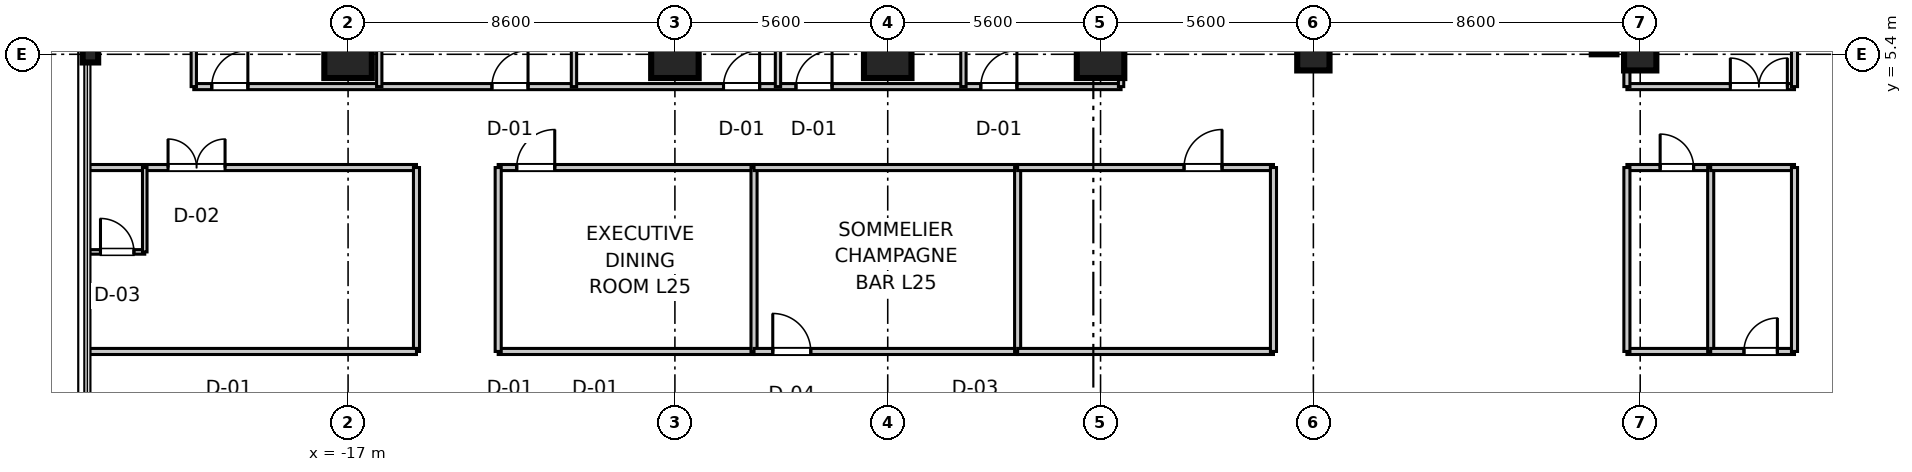
"""IFC4 building model, lengths in metres.
Left out: names, types, materials, properties, quantities, classifications, styles, units other than length and angle.
Written with IfcOpenShell. Run it as: python <this file> out.ifc"""

import sys

from ifc_helpers import new_model, si_unit, direction, frame, frame_2d, origin, origin_2d, place, context, subcontext, project, spatial, rectangle, i_section, extrude, source, transform, mapped, element, fill, save


model = new_model("IFC4")
c1 = context("Model", 3, precision=1e-05, world=origin(), true_north=direction((0.0, 1.0)))
c2 = subcontext(c1, "Body", "Model", "MODEL_VIEW")
j1 = project(units=[si_unit("LENGTHUNIT", "METRE"), si_unit("PLANEANGLEUNIT", "RADIAN")], contexts=[c1])
p1 = place(None, origin())
s1 = spatial("IfcSite", under=j1, at=p1, CompositionType="ELEMENT")
p2 = place(p1, origin())
s2 = spatial("IfcBuilding", under=s1, at=p2, CompositionType="ELEMENT")
p3 = place(p2, frame((0.0, 0.0, 102.9)))
s3 = spatial("IfcBuildingStorey", under=s2, at=p3, CompositionType="ELEMENT", Elevation=102.9)
m1 = source(origin(), c2, "Body", "SweptSolid", [
    extrude(rectangle(XDim=1.25, YDim=1.25, at=origin_2d()), origin(), (0.0, 0.0, 1.0), 3.605),
])
for number, where, z_axis, x_axis in (
    (1, (-17.0, 5.4, 0.0), (0.0, 0.0, 1.0), (1.0, 0.0, 0.0)),
    (2, (-8.4, 5.4, 0.0), (0.0, 0.0, 1.0), (1.0, 0.0, 0.0)),
    (3, (-2.8, 5.4, 0.0), (0.0, 0.0, 1.0), (1.0, 0.0, 0.0)),
    (4, (2.8, 5.4, 0.0), (0.0, 0.0, 1.0), (1.0, 0.0, 0.0)),
):
    element("IfcColumn", number, at=place(p3, frame(where, z_axis=z_axis, x_axis=x_axis)), inside=s3, PredefinedType="COLUMN", context=c2, shape_type="MappedRepresentation", body=[
        mapped(m1, transform((0.0, 0.0, 0.0), scale=1.0)),
    ])
m2 = source(origin(), c2, "Body", "SweptSolid", [
    extrude(rectangle(XDim=0.85, YDim=0.85, at=origin_2d()), origin(), (0.0, 0.0, 1.0), 3.605),
])
for number, where, z_axis, x_axis in (
    (5, (8.4, 5.4, 0.0), (0.0, 0.0, 1.0), (1.0, 0.0, 0.0)),
    (6, (17.0, 5.4, 0.0), (0.0, 0.0, 1.0), (1.0, 0.0, 0.0)),
):
    element("IfcColumn", number, at=place(p3, frame(where, z_axis=z_axis, x_axis=x_axis)), inside=s3, PredefinedType="PILASTER", context=c2, shape_type="MappedRepresentation", body=[
        mapped(m2, transform((0.0, 0.0, 0.0), scale=1.0)),
    ])
m3 = source(origin(), c2, "Body", "SweptSolid", [
    extrude(i_section(OverallWidth=0.409, OverallDepth=0.43, WebThickness=0.021, FlangeThickness=0.034, at=origin_2d()), origin(), (0.0, 0.0, 1.0), 3.605),
])
p4 = place(p3, frame((-23.78, 5.4, 0.0), z_axis=(0.0, 0.0, 1.0), x_axis=(1.0, 0.0, 0.0)))
e7 = element("IfcColumn", 7, at=p4, inside=s3, PredefinedType="COLUMN", context=c2, shape_type="MappedRepresentation", body=[
    mapped(m3, transform((0.0, 0.0, 0.0), scale=1.0)),
])
m4 = source(origin(), c2, "Body", "SweptSolid", [
    extrude(rectangle(XDim=11.6, YDim=0.65, at=frame_2d((5.8, 0.0))), origin(), (0.0, 0.0, 1.0), 3.38),
])
p5 = place(p3, frame((16.05, 5.4, 0.0), z_axis=(0.0, 0.0, 1.0), x_axis=(0.0, 1.0, 0.0)))
e8 = element("IfcWall", 8, at=p5, inside=s3, PredefinedType="SHEAR", context=c2, shape_type="MappedRepresentation", body=[
    mapped(m4, transform((0.0, 0.0, 0.0), scale=1.0)),
])
m5 = source(origin(), c2, "Body", "SweptSolid", [
    extrude(rectangle(XDim=4.41, YDim=0.16, at=frame_2d((2.205, 0.0))), origin(), (0.0, 0.0, 1.0), 2.72),
])
p6 = place(p3, frame((16.65, 4.55, 0.0), z_axis=(0.0, 0.0, 1.0), x_axis=(1.0, 0.0, 0.0)))
e9 = element("IfcWall", 9, at=p6, inside=s3, PredefinedType="PARTITIONING", context=c2, shape_type="MappedRepresentation", body=[
    mapped(m5, transform((0.0, 0.0, 0.0), scale=1.0)),
])
p7 = place(p6, frame((2.722, 0.0, 0.0)))
e10 = element("IfcOpeningElement", 10, at=p7, cuts=e9, PredefinedType="OPENING", context=c2, shape_type="SweptSolid", body=[
    extrude(rectangle(XDim=1.5, YDim=2.15, at=frame_2d((0.75, 1.075))), frame((0.0, 0.09, 0.0), z_axis=(0.0, -1.0, 0.0), x_axis=(1.0, 0.0, 0.0)), (0.0, 0.0, 1.0), 0.18),
])
m6 = source(origin(), c2, "Body", "SweptSolid", [
    extrude(rectangle(XDim=19.25, YDim=0.16, at=frame_2d((9.625, 0.0))), origin(), (0.0, 0.0, 1.0), 2.72),
])
p8 = place(p3, frame((16.65, 4.55, 0.0), z_axis=(0.0, 0.0, 1.0), x_axis=(0.0, 1.0, 0.0)))
e11 = element("IfcWall", 11, at=p8, inside=s3, PredefinedType="PARTITIONING", context=c2, shape_type="MappedRepresentation", body=[
    mapped(m6, transform((0.0, 0.0, 0.0), scale=1.0)),
])
m7 = source(origin(), c2, "Body", "SweptSolid", [
    extrude(rectangle(XDim=17.83, YDim=0.16, at=frame_2d((8.915, 0.0))), origin(), (0.0, 0.0, 1.0), 2.72),
])
p9 = place(p3, frame((21.06, 4.55, 0.0), z_axis=(0.0, 0.0, 1.0), x_axis=(0.0, 1.0, 0.0)))
e12 = element("IfcWall", 12, at=p9, inside=s3, PredefinedType="PARTITIONING", context=c2, shape_type="MappedRepresentation", body=[
    mapped(m7, transform((0.0, 0.0, 0.0), scale=1.0)),
])
m8 = source(origin(), c2, "Body", "SweptSolid", [
    extrude(rectangle(XDim=24.4, YDim=0.16, at=frame_2d((12.2, 0.0))), origin(), (0.0, 0.0, 1.0), 2.72),
])
p10 = place(p3, frame((-21.06, 4.55, 0.0), z_axis=(0.0, 0.0, 1.0), x_axis=(1.0, 0.0, 0.0)))
e13 = element("IfcWall", 13, at=p10, inside=s3, PredefinedType="PARTITIONING", context=c2, shape_type="MappedRepresentation", body=[
    mapped(m8, transform((0.0, 0.0, 0.0), scale=1.0)),
])
p11 = place(p10, frame((0.473, 0.0, 0.0)))
e14 = element("IfcOpeningElement", 14, at=p11, cuts=e13, PredefinedType="OPENING", context=c2, shape_type="SweptSolid", body=[
    extrude(rectangle(XDim=0.95, YDim=2.1, at=frame_2d((0.475, 1.05))), frame((0.0, 0.09, 0.0), z_axis=(0.0, -1.0, 0.0), x_axis=(1.0, 0.0, 0.0)), (0.0, 0.0, 1.0), 0.18),
])
p12 = place(p10, frame((7.845, 0.0, 0.0)))
e15 = element("IfcOpeningElement", 15, at=p12, cuts=e13, PredefinedType="OPENING", context=c2, shape_type="SweptSolid", body=[
    extrude(rectangle(XDim=0.95, YDim=2.1, at=frame_2d((0.475, 1.05))), frame((0.0, 0.09, 0.0), z_axis=(0.0, -1.0, 0.0), x_axis=(1.0, 0.0, 0.0)), (0.0, 0.0, 1.0), 0.18),
])
p13 = place(p10, frame((13.939, 0.0, 0.0)))
e16 = element("IfcOpeningElement", 16, at=p13, cuts=e13, PredefinedType="OPENING", context=c2, shape_type="SweptSolid", body=[
    extrude(rectangle(XDim=0.95, YDim=2.1, at=frame_2d((0.475, 1.05))), frame((0.0, 0.09, 0.0), z_axis=(0.0, -1.0, 0.0), x_axis=(1.0, 0.0, 0.0)), (0.0, 0.0, 1.0), 0.18),
])
p14 = place(p10, frame((15.845, 0.0, 0.0)))
e17 = element("IfcOpeningElement", 17, at=p14, cuts=e13, PredefinedType="OPENING", context=c2, shape_type="SweptSolid", body=[
    extrude(rectangle(XDim=0.95, YDim=2.1, at=frame_2d((0.475, 1.05))), frame((0.0, 0.09, 0.0), z_axis=(0.0, -1.0, 0.0), x_axis=(1.0, 0.0, 0.0)), (0.0, 0.0, 1.0), 0.18),
])
p15 = place(p10, frame((20.709, 0.0, 0.0)))
e18 = element("IfcOpeningElement", 18, at=p15, cuts=e13, PredefinedType="OPENING", context=c2, shape_type="SweptSolid", body=[
    extrude(rectangle(XDim=0.95, YDim=2.1, at=frame_2d((0.475, 1.05))), frame((0.0, 0.09, 0.0), z_axis=(0.0, -1.0, 0.0), x_axis=(1.0, 0.0, 0.0)), (0.0, 0.0, 1.0), 0.18),
])
m9 = source(origin(), c2, "Body", "SweptSolid", [
    extrude(rectangle(XDim=17.83, YDim=0.14, at=frame_2d((8.915, 0.0))), origin(), (0.0, 0.0, 1.0), 2.72),
])
p16 = place(p3, frame((-21.06, 4.55, 0.0), z_axis=(0.0, 0.0, 1.0), x_axis=(0.0, 1.0, 0.0)))
e19 = element("IfcWall", 19, at=p16, inside=s3, PredefinedType="PARTITIONING", context=c2, shape_type="MappedRepresentation", body=[
    mapped(m9, transform((0.0, 0.0, 0.0), scale=1.0)),
])
m10 = source(origin(), c2, "Body", "SweptSolid", [
    extrude(rectangle(XDim=19.25, YDim=0.14, at=frame_2d((9.625, 0.0))), origin(), (0.0, 0.0, 1.0), 2.72),
])
for number, where, z_axis, x_axis in (
    (20, (3.34, 4.55, 0.0), (0.0, 0.0, 1.0), (0.0, 1.0, 0.0)),
    (21, (-16.18, 4.55, 0.0), (0.0, 0.0, 1.0), (0.0, 1.0, 0.0)),
    (22, (-11.056, 4.55, 0.0), (0.0, 0.0, 1.0), (0.0, 1.0, 0.0)),
    (23, (-5.688, 4.55, 0.0), (0.0, 0.0, 1.0), (0.0, 1.0, 0.0)),
    (24, (-0.808, 4.55, 0.0), (0.0, 0.0, 1.0), (0.0, 1.0, 0.0)),
):
    element("IfcWall", number, at=place(p3, frame(where, z_axis=z_axis, x_axis=x_axis)), inside=s3, PredefinedType="PARTITIONING", context=c2, shape_type="MappedRepresentation", body=[
        mapped(m10, transform((0.0, 0.0, 0.0), scale=1.0)),
    ])
m11 = source(origin(), c2, "Body", "SweptSolid", [
    extrude(rectangle(XDim=8.6, YDim=0.16, at=frame_2d((4.3, 0.0))), origin(), (0.0, 0.0, 1.0), 2.72),
])
p17 = place(p3, frame((-23.8, 2.42, 0.0), z_axis=(0.0, 0.0, 1.0), x_axis=(1.0, 0.0, 0.0)))
e25 = element("IfcWall", 25, at=p17, inside=s3, PredefinedType="PARTITIONING", context=c2, shape_type="MappedRepresentation", body=[
    mapped(m11, transform((0.0, 0.0, 0.0), scale=1.0)),
])
p18 = place(p17, frame((2.063, 0.0, 0.0)))
e26 = element("IfcOpeningElement", 26, at=p18, cuts=e25, PredefinedType="OPENING", context=c2, shape_type="SweptSolid", body=[
    extrude(rectangle(XDim=1.5, YDim=2.15, at=frame_2d((0.75, 1.075))), frame((0.0, 0.09, 0.0), z_axis=(0.0, -1.0, 0.0), x_axis=(1.0, 0.0, 0.0)), (0.0, 0.0, 1.0), 0.18),
])
m12 = source(origin(), c2, "Body", "SweptSolid", [
    extrude(rectangle(XDim=4.84, YDim=0.16, at=frame_2d((2.42, 0.0))), origin(), (0.0, 0.0, 1.0), 2.72),
])
p19 = place(p3, frame((-15.2, -2.42, 0.0), z_axis=(0.0, 0.0, 1.0), x_axis=(0.0, 1.0, 0.0)))
e27 = element("IfcWall", 27, at=p19, inside=s3, PredefinedType="PARTITIONING", context=c2, shape_type="MappedRepresentation", body=[
    mapped(m12, transform((0.0, 0.0, 0.0), scale=1.0)),
])
p20 = place(p3, frame((-23.8, -2.42, 0.0), z_axis=(0.0, 0.0, 1.0), x_axis=(1.0, 0.0, 0.0)))
e28 = element("IfcWall", 28, at=p20, inside=s3, PredefinedType="PARTITIONING", context=c2, shape_type="MappedRepresentation", body=[
    mapped(m11, transform((0.0, 0.0, 0.0), scale=1.0)),
])
m13 = source(origin(), c2, "Body", "SweptSolid", [
    extrude(rectangle(XDim=1.45, YDim=0.12, at=frame_2d((0.725, 0.0))), origin(), (0.0, 0.0, 1.0), 2.72),
])
p21 = place(p3, frame((-23.8, 0.2, 0.0), z_axis=(0.0, 0.0, 1.0), x_axis=(1.0, 0.0, 0.0)))
e29 = element("IfcWall", 29, at=p21, inside=s3, PredefinedType="PARTITIONING", context=c2, shape_type="MappedRepresentation", body=[
    mapped(m13, transform((0.0, 0.0, 0.0), scale=1.0)),
])
p22 = place(p21, frame((0.285, 0.0, 0.0)))
e30 = element("IfcOpeningElement", 30, at=p22, cuts=e29, PredefinedType="OPENING", context=c2, shape_type="SweptSolid", body=[
    extrude(rectangle(XDim=0.88, YDim=2.1, at=frame_2d((0.44, 1.05))), frame((0.0, 0.07, 0.0), z_axis=(0.0, -1.0, 0.0), x_axis=(1.0, 0.0, 0.0)), (0.0, 0.0, 1.0), 0.14),
])
m14 = source(origin(), c2, "Body", "SweptSolid", [
    extrude(rectangle(XDim=2.22, YDim=0.12, at=frame_2d((1.11, 0.0))), origin(), (0.0, 0.0, 1.0), 2.72),
])
p23 = place(p3, frame((-22.35, 0.2, 0.0), z_axis=(0.0, 0.0, 1.0), x_axis=(0.0, 1.0, 0.0)))
e31 = element("IfcWall", 31, at=p23, inside=s3, PredefinedType="PARTITIONING", context=c2, shape_type="MappedRepresentation", body=[
    mapped(m14, transform((0.0, 0.0, 0.0), scale=1.0)),
])
m15 = source(origin(), c2, "Body", "SweptSolid", [
    extrude(rectangle(XDim=6.732, YDim=0.16, at=frame_2d((3.366, 0.0))), origin(), (0.0, 0.0, 1.0), 2.72),
])
p24 = place(p3, frame((-13.05, -2.42, 0.0), z_axis=(0.0, 0.0, 1.0), x_axis=(1.0, 0.0, 0.0)))
e32 = element("IfcWall", 32, at=p24, inside=s3, PredefinedType="PARTITIONING", context=c2, shape_type="MappedRepresentation", body=[
    mapped(m15, transform((0.0, 0.0, 0.0), scale=1.0)),
])
p25 = place(p3, frame((-13.05, 2.42, 0.0), z_axis=(0.0, 0.0, 1.0), x_axis=(1.0, 0.0, 0.0)))
e33 = element("IfcWall", 33, at=p25, inside=s3, PredefinedType="PARTITIONING", context=c2, shape_type="MappedRepresentation", body=[
    mapped(m15, transform((0.0, 0.0, 0.0), scale=1.0)),
])
p26 = place(p25, frame((0.488, 0.0, 0.0)))
e34 = element("IfcOpeningElement", 34, at=p26, cuts=e33, PredefinedType="OPENING", context=c2, shape_type="SweptSolid", body=[
    extrude(rectangle(XDim=1.0, YDim=2.1, at=frame_2d((0.5, 1.05))), frame((0.0, 0.09, 0.0), z_axis=(0.0, -1.0, 0.0), x_axis=(1.0, 0.0, 0.0)), (0.0, 0.0, 1.0), 0.18),
])
for number, where, z_axis, x_axis in (
    (35, (-13.05, -2.42, 0.0), (0.0, 0.0, 1.0), (0.0, 1.0, 0.0)),
    (36, (-6.318, -2.42, 0.0), (0.0, 0.0, 1.0), (0.0, 1.0, 0.0)),
):
    element("IfcWall", number, at=place(p3, frame(where, z_axis=z_axis, x_axis=x_axis)), inside=s3, PredefinedType="PARTITIONING", context=c2, shape_type="MappedRepresentation", body=[
        mapped(m12, transform((0.0, 0.0, 0.0), scale=1.0)),
    ])
m16 = source(origin(), c2, "Body", "SweptSolid", [
    extrude(rectangle(XDim=6.936, YDim=0.16, at=frame_2d((3.468, 0.0))), origin(), (0.0, 0.0, 1.0), 2.72),
])
p27 = place(p3, frame((-6.318, -2.42, 0.0), z_axis=(0.0, 0.0, 1.0), x_axis=(1.0, 0.0, 0.0)))
e37 = element("IfcWall", 37, at=p27, inside=s3, PredefinedType="PARTITIONING", context=c2, shape_type="MappedRepresentation", body=[
    mapped(m16, transform((0.0, 0.0, 0.0), scale=1.0)),
])
p28 = place(p27, frame((0.493, 0.0, 0.0)))
e38 = element("IfcOpeningElement", 38, at=p28, cuts=e37, PredefinedType="OPENING", context=c2, shape_type="SweptSolid", body=[
    extrude(rectangle(XDim=1.0, YDim=2.1, at=frame_2d((0.5, 1.05))), frame((0.0, 0.09, 0.0), z_axis=(0.0, -1.0, 0.0), x_axis=(1.0, 0.0, 0.0)), (0.0, 0.0, 1.0), 0.18),
])
p29 = place(p3, frame((-6.318, 2.42, 0.0), z_axis=(0.0, 0.0, 1.0), x_axis=(1.0, 0.0, 0.0)))
e39 = element("IfcWall", 39, at=p29, inside=s3, PredefinedType="PARTITIONING", context=c2, shape_type="MappedRepresentation", body=[
    mapped(m16, transform((0.0, 0.0, 0.0), scale=1.0)),
])
p30 = place(p3, frame((0.618, -2.42, 0.0), z_axis=(0.0, 0.0, 1.0), x_axis=(0.0, 1.0, 0.0)))
e40 = element("IfcWall", 40, at=p30, inside=s3, PredefinedType="PARTITIONING", context=c2, shape_type="MappedRepresentation", body=[
    mapped(m12, transform((0.0, 0.0, 0.0), scale=1.0)),
])
m17 = source(origin(), c2, "Body", "SweptSolid", [
    extrude(rectangle(XDim=6.732, YDim=0.16, at=frame_2d((3.366, 0.0))), origin(), (0.0, 0.0, 1.0), 2.72),
])
p31 = place(p3, frame((0.618, -2.42, 0.0), z_axis=(0.0, 0.0, 1.0), x_axis=(1.0, 0.0, 0.0)))
e41 = element("IfcWall", 41, at=p31, inside=s3, PredefinedType="PARTITIONING", context=c2, shape_type="MappedRepresentation", body=[
    mapped(m17, transform((0.0, 0.0, 0.0), scale=1.0)),
])
p32 = place(p3, frame((0.618, 2.42, 0.0), z_axis=(0.0, 0.0, 1.0), x_axis=(1.0, 0.0, 0.0)))
e42 = element("IfcWall", 42, at=p32, inside=s3, PredefinedType="PARTITIONING", context=c2, shape_type="MappedRepresentation", body=[
    mapped(m17, transform((0.0, 0.0, 0.0), scale=1.0)),
])
p33 = place(p32, frame((4.379, 0.0, 0.0)))
e43 = element("IfcOpeningElement", 43, at=p33, cuts=e42, PredefinedType="OPENING", context=c2, shape_type="SweptSolid", body=[
    extrude(rectangle(XDim=1.0, YDim=2.1, at=frame_2d((0.5, 1.05))), frame((0.0, 0.09, 0.0), z_axis=(0.0, -1.0, 0.0), x_axis=(1.0, 0.0, 0.0)), (0.0, 0.0, 1.0), 0.18),
])
p34 = place(p3, frame((7.35, -2.42, 0.0), z_axis=(0.0, 0.0, 1.0), x_axis=(0.0, 1.0, 0.0)))
e44 = element("IfcWall", 44, at=p34, inside=s3, PredefinedType="PARTITIONING", context=c2, shape_type="MappedRepresentation", body=[
    mapped(m12, transform((0.0, 0.0, 0.0), scale=1.0)),
])
m18 = source(origin(), c2, "Body", "SweptSolid", [
    extrude(rectangle(XDim=2.205, YDim=0.16, at=frame_2d((1.103, 0.0))), origin(), (0.0, 0.0, 1.0), 2.72),
])
p35 = place(p3, frame((16.65, -2.42, 0.0), z_axis=(0.0, 0.0, 1.0), x_axis=(1.0, 0.0, 0.0)))
e45 = element("IfcWall", 45, at=p35, inside=s3, PredefinedType="PARTITIONING", context=c2, shape_type="MappedRepresentation", body=[
    mapped(m18, transform((0.0, 0.0, 0.0), scale=1.0)),
])
p36 = place(p3, frame((16.65, 2.42, 0.0), z_axis=(0.0, 0.0, 1.0), x_axis=(1.0, 0.0, 0.0)))
e46 = element("IfcWall", 46, at=p36, inside=s3, PredefinedType="PARTITIONING", context=c2, shape_type="MappedRepresentation", body=[
    mapped(m18, transform((0.0, 0.0, 0.0), scale=1.0)),
])
p37 = place(p36, frame((0.875, 0.0, 0.0)))
e47 = element("IfcOpeningElement", 47, at=p37, cuts=e46, PredefinedType="OPENING", context=c2, shape_type="SweptSolid", body=[
    extrude(rectangle(XDim=0.88, YDim=2.1, at=frame_2d((0.44, 1.05))), frame((0.0, 0.09, 0.0), z_axis=(0.0, -1.0, 0.0), x_axis=(1.0, 0.0, 0.0)), (0.0, 0.0, 1.0), 0.18),
])
for number, where, z_axis, x_axis in (
    (48, (16.65, -2.42, 0.0), (0.0, 0.0, 1.0), (0.0, 1.0, 0.0)),
    (49, (18.855, -2.42, 0.0), (0.0, 0.0, 1.0), (0.0, 1.0, 0.0)),
):
    element("IfcWall", number, at=place(p3, frame(where, z_axis=z_axis, x_axis=x_axis)), inside=s3, PredefinedType="PARTITIONING", context=c2, shape_type="MappedRepresentation", body=[
        mapped(m12, transform((0.0, 0.0, 0.0), scale=1.0)),
    ])
p38 = place(p3, frame((18.855, -2.42, 0.0), z_axis=(0.0, 0.0, 1.0), x_axis=(1.0, 0.0, 0.0)))
e50 = element("IfcWall", 50, at=p38, inside=s3, PredefinedType="PARTITIONING", context=c2, shape_type="MappedRepresentation", body=[
    mapped(m18, transform((0.0, 0.0, 0.0), scale=1.0)),
])
p39 = place(p38, frame((0.875, 0.0, 0.0)))
e51 = element("IfcOpeningElement", 51, at=p39, cuts=e50, PredefinedType="OPENING", context=c2, shape_type="SweptSolid", body=[
    extrude(rectangle(XDim=0.88, YDim=2.1, at=frame_2d((0.44, 1.05))), frame((0.0, 0.09, 0.0), z_axis=(0.0, -1.0, 0.0), x_axis=(1.0, 0.0, 0.0)), (0.0, 0.0, 1.0), 0.18),
])
p40 = place(p3, frame((18.855, 2.42, 0.0), z_axis=(0.0, 0.0, 1.0), x_axis=(1.0, 0.0, 0.0)))
e52 = element("IfcWall", 52, at=p40, inside=s3, PredefinedType="PARTITIONING", context=c2, shape_type="MappedRepresentation", body=[
    mapped(m18, transform((0.0, 0.0, 0.0), scale=1.0)),
])
p41 = place(p3, frame((21.06, -2.42, 0.0), z_axis=(0.0, 0.0, 1.0), x_axis=(0.0, 1.0, 0.0)))
e53 = element("IfcWall", 53, at=p41, inside=s3, PredefinedType="PARTITIONING", context=c2, shape_type="MappedRepresentation", body=[
    mapped(m12, transform((0.0, 0.0, 0.0), scale=1.0)),
])
m19 = source(origin(), c2, "Body", "SweptSolid", [
    extrude(rectangle(XDim=1.5, YDim=2.15, at=frame_2d((0.75, 1.075))), frame((0.0, 0.025, 0.0), z_axis=(0.0, -1.0, 0.0), x_axis=(1.0, 0.0, 0.0)), (0.0, 0.0, 1.0), 0.05),
])
p42 = place(p7, origin())
e54 = element("IfcDoor", 54, at=p42, inside=s3, OperationType="DOUBLE_DOOR_SINGLE_SWING", PredefinedType="DOOR", context=c2, shape_type="MappedRepresentation", body=[
    mapped(m19, transform((0.0, 0.0, 0.0), scale=1.0)),
])
fill(e10, e54)
m20 = source(origin(), c2, "Body", "SweptSolid", [
    extrude(rectangle(XDim=0.95, YDim=2.1, at=frame_2d((0.475, 1.05))), frame((0.0, 0.025, 0.0), z_axis=(0.0, -1.0, 0.0), x_axis=(1.0, 0.0, 0.0)), (0.0, 0.0, 1.0), 0.05),
])
p43 = place(p11, origin())
e55 = element("IfcDoor", 55, at=p43, inside=s3, OperationType="SINGLE_SWING_RIGHT", PredefinedType="DOOR", context=c2, shape_type="MappedRepresentation", body=[
    mapped(m20, transform((0.0, 0.0, 0.0), scale=1.0)),
])
fill(e14, e55)
p44 = place(p12, origin())
e56 = element("IfcDoor", 56, at=p44, inside=s3, OperationType="SINGLE_SWING_RIGHT", PredefinedType="DOOR", context=c2, shape_type="MappedRepresentation", body=[
    mapped(m20, transform((0.0, 0.0, 0.0), scale=1.0)),
])
fill(e15, e56)
p45 = place(p13, origin())
e57 = element("IfcDoor", 57, at=p45, inside=s3, OperationType="SINGLE_SWING_RIGHT", PredefinedType="DOOR", context=c2, shape_type="MappedRepresentation", body=[
    mapped(m20, transform((0.0, 0.0, 0.0), scale=1.0)),
])
fill(e16, e57)
p46 = place(p14, origin())
e58 = element("IfcDoor", 58, at=p46, inside=s3, OperationType="SINGLE_SWING_RIGHT", PredefinedType="DOOR", context=c2, shape_type="MappedRepresentation", body=[
    mapped(m20, transform((0.0, 0.0, 0.0), scale=1.0)),
])
fill(e17, e58)
p47 = place(p15, origin())
e59 = element("IfcDoor", 59, at=p47, inside=s3, OperationType="SINGLE_SWING_RIGHT", PredefinedType="DOOR", context=c2, shape_type="MappedRepresentation", body=[
    mapped(m20, transform((0.0, 0.0, 0.0), scale=1.0)),
])
fill(e18, e59)
m21 = source(origin(), c2, "Body", "SweptSolid", [
    extrude(rectangle(XDim=0.88, YDim=2.1, at=frame_2d((0.44, 1.05))), frame((0.0, 0.025, 0.0), z_axis=(0.0, -1.0, 0.0), x_axis=(1.0, 0.0, 0.0)), (0.0, 0.0, 1.0), 0.05),
])
p48 = place(p22, origin())
e60 = element("IfcDoor", 60, at=p48, inside=s3, OperationType="SINGLE_SWING_LEFT", PredefinedType="DOOR", context=c2, shape_type="MappedRepresentation", body=[
    mapped(m21, transform((0.0, 0.0, 0.0), scale=1.0)),
])
fill(e30, e60)
p49 = place(p18, origin())
e61 = element("IfcDoor", 61, at=p49, inside=s3, OperationType="DOUBLE_DOOR_SINGLE_SWING", PredefinedType="DOOR", context=c2, shape_type="MappedRepresentation", body=[
    mapped(m19, transform((0.0, 0.0, 0.0), scale=1.0)),
])
fill(e26, e61)
m22 = source(origin(), c2, "Body", "SweptSolid", [
    extrude(rectangle(XDim=1.0, YDim=2.1, at=frame_2d((0.5, 1.05))), frame((0.0, 0.025, 0.0), z_axis=(0.0, -1.0, 0.0), x_axis=(1.0, 0.0, 0.0)), (0.0, 0.0, 1.0), 0.05),
])
p50 = place(p26, frame((1.0, 0.0, 0.0), z_axis=(0.0, 0.0, 1.0), x_axis=(-1.0, 0.0, 0.0)))
e62 = element("IfcDoor", 62, at=p50, inside=s3, OperationType="SINGLE_SWING_RIGHT", PredefinedType="DOOR", context=c2, shape_type="MappedRepresentation", body=[
    mapped(m22, transform((0.0, 0.0, 0.0), scale=1.0)),
])
fill(e34, e62)
p51 = place(p28, origin())
e63 = element("IfcDoor", 63, at=p51, inside=s3, OperationType="SINGLE_SWING_LEFT", PredefinedType="DOOR", context=c2, shape_type="MappedRepresentation", body=[
    mapped(m22, transform((0.0, 0.0, 0.0), scale=1.0)),
])
fill(e38, e63)
p52 = place(p33, frame((1.0, 0.0, 0.0), z_axis=(0.0, 0.0, 1.0), x_axis=(-1.0, 0.0, 0.0)))
e64 = element("IfcDoor", 64, at=p52, inside=s3, OperationType="SINGLE_SWING_RIGHT", PredefinedType="DOOR", context=c2, shape_type="MappedRepresentation", body=[
    mapped(m22, transform((0.0, 0.0, 0.0), scale=1.0)),
])
fill(e43, e64)
p53 = place(p37, frame((0.88, 0.0, 0.0), z_axis=(0.0, 0.0, 1.0), x_axis=(-1.0, 0.0, 0.0)))
e65 = element("IfcDoor", 65, at=p53, inside=s3, OperationType="SINGLE_SWING_LEFT", PredefinedType="DOOR", context=c2, shape_type="MappedRepresentation", body=[
    mapped(m21, transform((0.0, 0.0, 0.0), scale=1.0)),
])
fill(e47, e65)
p54 = place(p39, origin())
e66 = element("IfcDoor", 66, at=p54, inside=s3, OperationType="SINGLE_SWING_RIGHT", PredefinedType="DOOR", context=c2, shape_type="MappedRepresentation", body=[
    mapped(m21, transform((0.0, 0.0, 0.0), scale=1.0)),
])
fill(e51, e66)
save(model, sys.argv[1])
